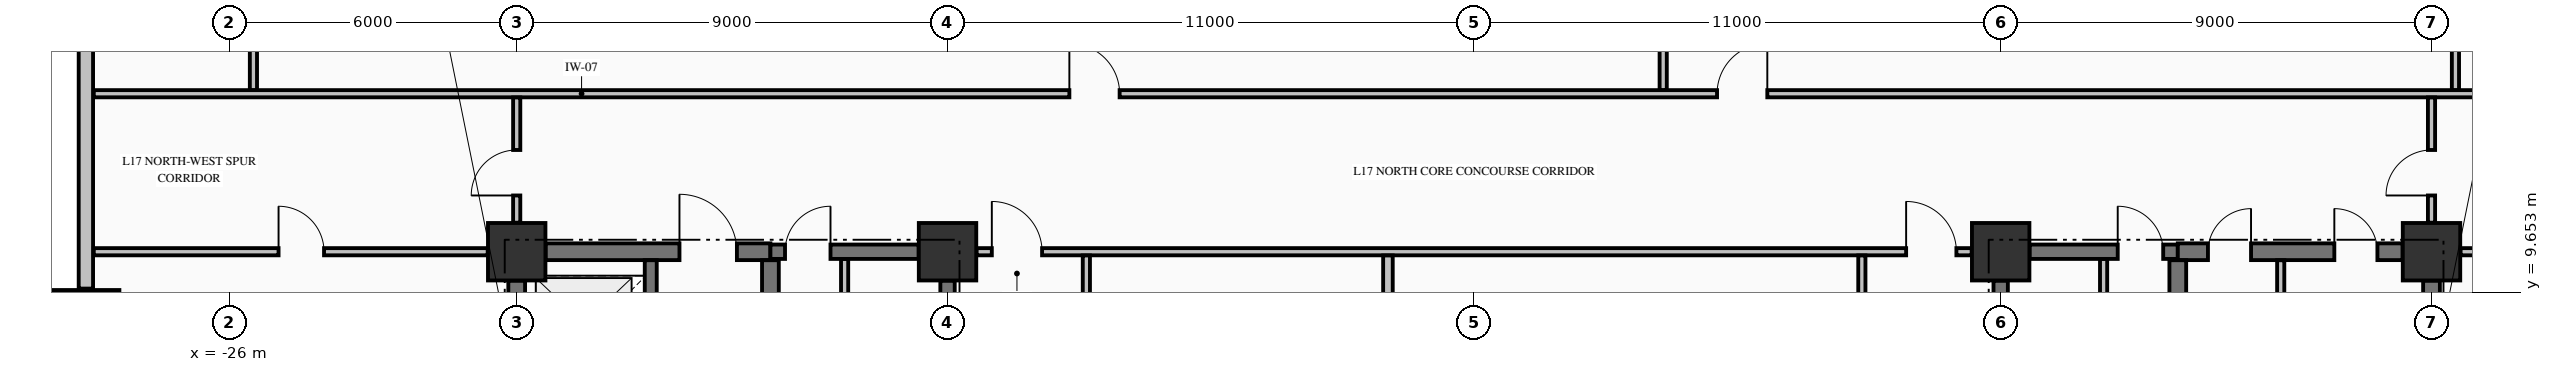
"""IFC4 building model, lengths in metres.
Left out: names, types, materials, properties, quantities, classifications, styles, units other than length and angle.
Written with IfcOpenShell. Run it as: python <this file> out.ifc"""

import sys

from ifc_helpers import new_model, si_unit, direction, frame, frame_2d, origin, origin_2d, place, context, subcontext, project, spatial, rectangle, extrude, element, fill, save


model = new_model("IFC4")
c1 = context("Model", 3, precision=1e-05, world=origin(), true_north=direction((0.0, 1.0)))
c2 = subcontext(c1, "Body", "Model", "MODEL_VIEW")
j1 = project(units=[si_unit("LENGTHUNIT", "METRE"), si_unit("PLANEANGLEUNIT", "RADIAN")], contexts=[c1])
p1 = place(None, origin())
s1 = spatial("IfcSite", under=j1, at=p1, CompositionType="ELEMENT")
p2 = place(p1, origin())
s2 = spatial("IfcBuilding", under=s1, at=p2, CompositionType="ELEMENT")
p3 = place(p2, frame((0.0, 0.0, 71.47)))
s3 = spatial("IfcBuildingStorey", under=s2, at=p3, CompositionType="ELEMENT", Elevation=71.47)
p4 = place(p3, frame((-29.0, 9.0, -0.325), z_axis=(0.0, 0.0, 1.0), x_axis=(1.0, 0.0, 0.0)))
e1 = element("IfcColumn", 1, at=p4, inside=s3, PredefinedType="COLUMN", context=c2, shape_type="SweptSolid", body=[
    extrude(rectangle(XDim=1.4, YDim=1.4, at=origin_2d()), origin(), (0.0, 0.0, 1.0), 3.645),
])
for number, where, z_axis, x_axis in (
    (2, (-20.0, 10.5, -0.325), (0.0, 0.0, 1.0), (1.0, 0.0, 0.0)),
    (3, (-11.0, 10.5, -0.325), (0.0, 0.0, 1.0), (1.0, 0.0, 0.0)),
    (4, (11.0, 10.5, -0.325), (0.0, 0.0, 1.0), (1.0, 0.0, 0.0)),
    (5, (20.0, 10.5, -0.325), (0.0, 0.0, 1.0), (1.0, 0.0, 0.0)),
):
    element("IfcColumn", number, at=place(p3, frame(where, z_axis=z_axis, x_axis=x_axis)), inside=s3, PredefinedType="COLUMN", context=c2, shape_type="SweptSolid", body=[
        extrude(rectangle(XDim=1.2, YDim=1.2, at=origin_2d()), origin(), (0.0, 0.0, 1.0), 3.645),
    ])
p5 = place(p3, frame((-29.0, 22.27, 0.0), z_axis=(0.0, 0.0, 1.0), x_axis=(0.0, -1.0, 0.0)))
e6 = element("IfcWall", 6, at=p5, inside=s3, PredefinedType="STANDARD", context=c2, shape_type="SweptSolid", body=[
    extrude(rectangle(XDim=12.54, YDim=0.3, at=frame_2d((6.27, 0.0))), origin(), (0.0, 0.0, 1.0), 2.712),
])
p6 = place(p3, frame((-19.396, 10.5, 0.0), z_axis=(0.0, 0.0, 1.0), x_axis=(1.0, 0.0, 0.0)))
e7 = element("IfcWall", 7, at=p6, inside=s3, PredefinedType="SHEAR", context=c2, shape_type="SweptSolid", body=[
    extrude(rectangle(XDim=4.696, YDim=0.35, at=frame_2d((2.348, 0.0))), origin(), (0.0, 0.0, 1.0), 3.32),
])
p7 = place(p6, frame((2.796, 0.0, 0.0)))
e8 = element("IfcOpeningElement", 8, at=p7, cuts=e7, PredefinedType="OPENING", context=c2, shape_type="SweptSolid", body=[
    extrude(rectangle(XDim=1.2, YDim=2.15, at=frame_2d((0.6, 1.075))), frame((0.0, 0.185, 0.0), z_axis=(0.0, -1.0, 0.0), x_axis=(1.0, 0.0, 0.0)), (0.0, 0.0, 1.0), 0.37),
])
p8 = place(p3, frame((-14.7, 10.5, 0.0), z_axis=(0.0, 0.0, 1.0), x_axis=(1.0, 0.0, 0.0)))
e9 = element("IfcWall", 9, at=p8, inside=s3, PredefinedType="SHEAR", context=c2, shape_type="SweptSolid", body=[
    extrude(rectangle(XDim=3.096, YDim=0.3, at=frame_2d((1.548, 0.0))), origin(), (0.0, 0.0, 1.0), 3.32),
])
p9 = place(p8, frame((0.305, 0.0, 0.0)))
e10 = element("IfcOpeningElement", 10, at=p9, cuts=e9, PredefinedType="OPENING", context=c2, shape_type="SweptSolid", body=[
    extrude(rectangle(XDim=0.95, YDim=2.15, at=frame_2d((0.475, 1.075))), frame((0.0, 0.16, 0.0), z_axis=(0.0, -1.0, 0.0), x_axis=(1.0, 0.0, 0.0)), (0.0, 0.0, 1.0), 0.32),
])
p10 = place(p3, frame((11.604, 10.5, 0.0), z_axis=(0.0, 0.0, 1.0), x_axis=(1.0, 0.0, 0.0)))
e11 = element("IfcWall", 11, at=p10, inside=s3, PredefinedType="SHEAR", context=c2, shape_type="SweptSolid", body=[
    extrude(rectangle(XDim=3.096, YDim=0.3, at=frame_2d((1.548, 0.0))), origin(), (0.0, 0.0, 1.0), 3.32),
])
p11 = place(p10, frame((1.841, 0.0, 0.0)))
e12 = element("IfcOpeningElement", 12, at=p11, cuts=e11, PredefinedType="OPENING", context=c2, shape_type="SweptSolid", body=[
    extrude(rectangle(XDim=0.95, YDim=2.15, at=frame_2d((0.475, 1.075))), frame((0.0, 0.16, 0.0), z_axis=(0.0, -1.0, 0.0), x_axis=(1.0, 0.0, 0.0)), (0.0, 0.0, 1.0), 0.32),
])
p12 = place(p3, frame((14.7, 10.5, 0.0), z_axis=(0.0, 0.0, 1.0), x_axis=(1.0, 0.0, 0.0)))
e13 = element("IfcWall", 13, at=p12, inside=s3, PredefinedType="SHEAR", context=c2, shape_type="SweptSolid", body=[
    extrude(rectangle(XDim=4.696, YDim=0.35, at=frame_2d((2.348, 0.0))), origin(), (0.0, 0.0, 1.0), 3.32),
])
p13 = place(p12, frame((0.63, 0.0, 0.0)))
e14 = element("IfcOpeningElement", 14, at=p13, cuts=e13, PredefinedType="OPENING", context=c2, shape_type="SweptSolid", body=[
    extrude(rectangle(XDim=0.9, YDim=2.15, at=frame_2d((0.45, 1.075))), frame((0.0, 0.185, 0.0), z_axis=(0.0, -1.0, 0.0), x_axis=(1.0, 0.0, 0.0)), (0.0, 0.0, 1.0), 0.37),
])
p14 = place(p12, frame((3.27, 0.0, 0.0)))
e15 = element("IfcOpeningElement", 15, at=p14, cuts=e13, PredefinedType="OPENING", context=c2, shape_type="SweptSolid", body=[
    extrude(rectangle(XDim=0.9, YDim=2.15, at=frame_2d((0.45, 1.075))), frame((0.0, 0.185, 0.0), z_axis=(0.0, -1.0, 0.0), x_axis=(1.0, 0.0, 0.0)), (0.0, 0.0, 1.0), 0.37),
])
p15 = place(p3, frame((-28.835, 10.5, 0.0), z_axis=(0.0, 0.0, 1.0), x_axis=(1.0, 0.0, 0.0)))
e16 = element("IfcWall", 16, at=p15, inside=s3, PredefinedType="PARTITIONING", context=c2, shape_type="SweptSolid", body=[
    extrude(rectangle(XDim=8.229, YDim=0.15, at=frame_2d((4.115, 0.0))), origin(), (0.0, 0.0, 1.0), 3.32),
])
p16 = place(p15, frame((3.86, 0.0, 0.0)))
e17 = element("IfcOpeningElement", 17, at=p16, cuts=e16, PredefinedType="OPENING", context=c2, shape_type="SweptSolid", body=[
    extrude(rectangle(XDim=0.95, YDim=2.15, at=frame_2d((0.475, 1.075))), frame((0.0, 0.085, 0.0), z_axis=(0.0, -1.0, 0.0), x_axis=(1.0, 0.0, 0.0)), (0.0, 0.0, 1.0), 0.17),
])
p17 = place(p3, frame((-10.394, 10.5, 0.0), z_axis=(0.0, 0.0, 1.0), x_axis=(1.0, 0.0, 0.0)))
e18 = element("IfcWall", 18, at=p17, inside=s3, PredefinedType="PARTITIONING", context=c2, shape_type="SweptSolid", body=[
    extrude(rectangle(XDim=20.788, YDim=0.15, at=frame_2d((10.394, 0.0))), origin(), (0.0, 0.0, 1.0), 3.32),
])
p18 = place(p17, frame((0.319, 0.0, 0.0)))
e19 = element("IfcOpeningElement", 19, at=p18, cuts=e18, PredefinedType="OPENING", context=c2, shape_type="SweptSolid", body=[
    extrude(rectangle(XDim=1.05, YDim=2.15, at=frame_2d((0.525, 1.075))), frame((0.0, 0.085, 0.0), z_axis=(0.0, -1.0, 0.0), x_axis=(1.0, 0.0, 0.0)), (0.0, 0.0, 1.0), 0.17),
])
p19 = place(p17, frame((19.419, 0.0, 0.0)))
e20 = element("IfcOpeningElement", 20, at=p19, cuts=e18, PredefinedType="OPENING", context=c2, shape_type="SweptSolid", body=[
    extrude(rectangle(XDim=1.05, YDim=2.15, at=frame_2d((0.525, 1.075))), frame((0.0, 0.085, 0.0), z_axis=(0.0, -1.0, 0.0), x_axis=(1.0, 0.0, 0.0)), (0.0, 0.0, 1.0), 0.17),
])
p20 = place(p3, frame((20.606, 10.5, 0.0), z_axis=(0.0, 0.0, 1.0), x_axis=(1.0, 0.0, 0.0)))
e21 = element("IfcWall", 21, at=p20, inside=s3, PredefinedType="PARTITIONING", context=c2, shape_type="SweptSolid", body=[
    extrude(rectangle(XDim=3.229, YDim=0.15, at=frame_2d((1.615, 0.0))), origin(), (0.0, 0.0, 1.0), 3.32),
])
p21 = place(p20, frame((0.894, 0.0, 0.0)))
e22 = element("IfcOpeningElement", 22, at=p21, cuts=e21, PredefinedType="OPENING", context=c2, shape_type="SweptSolid", body=[
    extrude(rectangle(XDim=1.0, YDim=2.15, at=frame_2d((0.5, 1.075))), frame((0.0, 0.085, 0.0), z_axis=(0.0, -1.0, 0.0), x_axis=(1.0, 0.0, 0.0)), (0.0, 0.0, 1.0), 0.17),
])
p22 = place(p3, frame((-28.835, 13.8, 0.0), z_axis=(0.0, 0.0, 1.0), x_axis=(1.0, 0.0, 0.0)))
e23 = element("IfcWall", 23, at=p22, inside=s3, PredefinedType="PARTITIONING", context=c2, shape_type="SweptSolid", body=[
    extrude(rectangle(XDim=52.67, YDim=0.15, at=frame_2d((26.335, 0.0))), origin(), (0.0, 0.0, 1.0), 3.32),
])
p23 = place(p22, frame((20.38, 0.0, 0.0)))
e24 = element("IfcOpeningElement", 24, at=p23, cuts=e23, PredefinedType="OPENING", context=c2, shape_type="SweptSolid", body=[
    extrude(rectangle(XDim=1.05, YDim=2.15, at=frame_2d((0.525, 1.075))), frame((0.0, 0.085, 0.0), z_axis=(0.0, -1.0, 0.0), x_axis=(1.0, 0.0, 0.0)), (0.0, 0.0, 1.0), 0.17),
])
p24 = place(p22, frame((33.91, 0.0, 0.0)))
e25 = element("IfcOpeningElement", 25, at=p24, cuts=e23, PredefinedType="OPENING", context=c2, shape_type="SweptSolid", body=[
    extrude(rectangle(XDim=1.05, YDim=2.15, at=frame_2d((0.525, 1.075))), frame((0.0, 0.085, 0.0), z_axis=(0.0, -1.0, 0.0), x_axis=(1.0, 0.0, 0.0)), (0.0, 0.0, 1.0), 0.17),
])
p25 = place(p3, frame((-20.0, 7.727, 0.0), z_axis=(0.0, 0.0, 1.0), x_axis=(0.0, 1.0, 0.0)))
e26 = element("IfcWall", 26, at=p25, inside=s3, PredefinedType="SHEAR", context=c2, shape_type="SweptSolid", body=[
    extrude(rectangle(XDim=2.169, YDim=0.35, at=frame_2d((1.084, 0.0))), origin(), (0.0, 0.0, 1.0), 3.32),
])
p26 = place(p3, frame((-17.2, 7.727, 0.0), z_axis=(0.0, 0.0, 1.0), x_axis=(0.0, 1.0, 0.0)))
e27 = element("IfcWall", 27, at=p26, inside=s3, PredefinedType="SOLIDWALL", context=c2, shape_type="SweptSolid", body=[
    extrude(rectangle(XDim=2.596, YDim=0.25, at=frame_2d((1.298, 0.0))), origin(), (0.0, 0.0, 1.0), 3.32),
])
p27 = place(p26, frame((0.773, 0.0, 0.0)))
e28 = element("IfcOpeningElement", 28, at=p27, cuts=e27, PredefinedType="OPENING", context=c2, shape_type="SweptSolid", body=[
    extrude(rectangle(XDim=1.1, YDim=2.2, at=frame_2d((0.55, 1.1))), frame((0.0, 0.135, 0.0), z_axis=(0.0, -1.0, 0.0), x_axis=(1.0, 0.0, 0.0)), (0.0, 0.0, 1.0), 0.27),
])
p28 = place(p3, frame((-14.7, 5.852, 0.0), z_axis=(0.0, 0.0, 1.0), x_axis=(0.0, 1.0, 0.0)))
e29 = element("IfcWall", 29, at=p28, inside=s3, PredefinedType="SHEAR", context=c2, shape_type="SweptSolid", body=[
    extrude(rectangle(XDim=4.471, YDim=0.35, at=frame_2d((2.235, 0.0))), origin(), (0.0, 0.0, 1.0), 3.32),
])
for number, where, z_axis, x_axis in (
    (30, (-11.0, 5.852, 0.0), (0.0, 0.0, 1.0), (0.0, 1.0, 0.0)),
    (31, (11.0, 5.852, 0.0), (0.0, 0.0, 1.0), (0.0, 1.0, 0.0)),
):
    element("IfcWall", number, at=place(p3, frame(where, z_axis=z_axis, x_axis=x_axis)), inside=s3, PredefinedType="SHEAR", context=c2, shape_type="SweptSolid", body=[
        extrude(rectangle(XDim=4.044, YDim=0.3, at=frame_2d((2.022, 0.0))), origin(), (0.0, 0.0, 1.0), 3.32),
    ])
p29 = place(p3, frame((14.7, 5.852, 0.0), z_axis=(0.0, 0.0, 1.0), x_axis=(0.0, 1.0, 0.0)))
e32 = element("IfcWall", 32, at=p29, inside=s3, PredefinedType="SHEAR", context=c2, shape_type="SweptSolid", body=[
    extrude(rectangle(XDim=4.471, YDim=0.35, at=frame_2d((2.235, 0.0))), origin(), (0.0, 0.0, 1.0), 3.32),
])
p30 = place(p3, frame((20.0, 0.604, 0.0), z_axis=(0.0, 0.0, 1.0), x_axis=(0.0, 1.0, 0.0)))
e33 = element("IfcWall", 33, at=p30, inside=s3, PredefinedType="SHEAR", context=c2, shape_type="SweptSolid", body=[
    extrude(rectangle(XDim=9.292, YDim=0.35, at=frame_2d((4.646, 0.0))), origin(), (0.0, 0.0, 1.0), 3.32),
])
p31 = place(p3, frame((-25.5, 13.878, 0.0), z_axis=(0.0, 0.0, 1.0), x_axis=(0.0, 1.0, 0.0)))
e34 = element("IfcWall", 34, at=p31, inside=s3, PredefinedType="PARTITIONING", context=c2, shape_type="SweptSolid", body=[
    extrude(rectangle(XDim=8.416, YDim=0.15, at=frame_2d((4.208, 0.0))), origin(), (0.0, 0.0, 1.0), 3.32),
])
p32 = place(p3, frame((-20.0, 11.106, 0.0), z_axis=(0.0, 0.0, 1.0), x_axis=(0.0, 1.0, 0.0)))
e35 = element("IfcWall", 35, at=p32, inside=s3, PredefinedType="PARTITIONING", context=c2, shape_type="SweptSolid", body=[
    extrude(rectangle(XDim=2.616, YDim=0.15, at=frame_2d((1.308, 0.0))), origin(), (0.0, 0.0, 1.0), 2.66),
])
p33 = place(p32, frame((0.569, 0.0, 0.0)))
e36 = element("IfcOpeningElement", 36, at=p33, cuts=e35, PredefinedType="OPENING", context=c2, shape_type="SweptSolid", body=[
    extrude(rectangle(XDim=0.95, YDim=2.15, at=frame_2d((0.475, 1.075))), frame((0.0, 0.085, 0.0), z_axis=(0.0, -1.0, 0.0), x_axis=(1.0, 0.0, 0.0)), (0.0, 0.0, 1.0), 0.17),
])
p34 = place(p3, frame((-13.15, 7.228, 0.0), z_axis=(0.0, 0.0, 1.0), x_axis=(0.0, 1.0, 0.0)))
e37 = element("IfcWall", 37, at=p34, inside=s3, PredefinedType="PARTITIONING", context=c2, shape_type="SweptSolid", body=[
    extrude(rectangle(XDim=3.119, YDim=0.15, at=frame_2d((1.56, 0.0))), origin(), (0.0, 0.0, 1.0), 3.32),
])
p35 = place(p34, frame((1.097, 0.0, 0.0)))
e38 = element("IfcOpeningElement", 38, at=p35, cuts=e37, PredefinedType="OPENING", context=c2, shape_type="SweptSolid", body=[
    extrude(rectangle(XDim=0.95, YDim=2.15, at=frame_2d((0.475, 1.075))), frame((0.0, 0.085, 0.0), z_axis=(0.0, -1.0, 0.0), x_axis=(1.0, 0.0, 0.0)), (0.0, 0.0, 1.0), 0.17),
])
p36 = place(p3, frame((-8.1, -3.097, 0.0), z_axis=(0.0, 0.0, 1.0), x_axis=(0.0, 1.0, 0.0)))
e39 = element("IfcWall", 39, at=p36, inside=s3, PredefinedType="PARTITIONING", context=c2, shape_type="SweptSolid", body=[
    extrude(rectangle(XDim=13.519, YDim=0.15, at=frame_2d((6.76, 0.0))), origin(), (0.0, 0.0, 1.0), 3.32),
])
p37 = place(p36, frame((6.222, 0.0, 0.0)))
e40 = element("IfcOpeningElement", 40, at=p37, cuts=e39, PredefinedType="OPENING", context=c2, shape_type="SweptSolid", body=[
    extrude(rectangle(XDim=1.05, YDim=2.15, at=frame_2d((0.525, 1.075))), frame((0.0, 0.085, 0.0), z_axis=(0.0, -1.0, 0.0), x_axis=(1.0, 0.0, 0.0)), (0.0, 0.0, 1.0), 0.17),
])
p38 = place(p3, frame((-1.8, -1.097, 0.0), z_axis=(0.0, 0.0, 1.0), x_axis=(0.0, 1.0, 0.0)))
e41 = element("IfcWall", 41, at=p38, inside=s3, PredefinedType="PARTITIONING", context=c2, shape_type="SweptSolid", body=[
    extrude(rectangle(XDim=11.519, YDim=0.2, at=frame_2d((5.76, 0.0))), origin(), (0.0, 0.0, 1.0), 3.32),
])
p39 = place(p3, frame((3.95, 13.878, 0.0), z_axis=(0.0, 0.0, 1.0), x_axis=(0.0, 1.0, 0.0)))
e42 = element("IfcWall", 42, at=p39, inside=s3, PredefinedType="PARTITIONING", context=c2, shape_type="SweptSolid", body=[
    extrude(rectangle(XDim=12.562, YDim=0.15, at=frame_2d((6.281, 0.0))), origin(), (0.0, 0.0, 1.0), 3.32),
])
p40 = place(p3, frame((8.1, -1.097, 0.0), z_axis=(0.0, 0.0, 1.0), x_axis=(0.0, 1.0, 0.0)))
e43 = element("IfcWall", 43, at=p40, inside=s3, PredefinedType="PARTITIONING", context=c2, shape_type="SweptSolid", body=[
    extrude(rectangle(XDim=11.519, YDim=0.15, at=frame_2d((5.76, 0.0))), origin(), (0.0, 0.0, 1.0), 3.32),
])
p41 = place(p40, frame((5.197, 0.0, 0.0)))
e44 = element("IfcOpeningElement", 44, at=p41, cuts=e43, PredefinedType="OPENING", context=c2, shape_type="SweptSolid", body=[
    extrude(rectangle(XDim=1.1, YDim=2.15, at=frame_2d((0.55, 1.075))), frame((0.0, 0.085, 0.0), z_axis=(0.0, -1.0, 0.0), x_axis=(1.0, 0.0, 0.0)), (0.0, 0.0, 1.0), 0.17),
])
p42 = place(p3, frame((13.15, 7.228, 0.0), z_axis=(0.0, 0.0, 1.0), x_axis=(0.0, 1.0, 0.0)))
e45 = element("IfcWall", 45, at=p42, inside=s3, PredefinedType="PARTITIONING", context=c2, shape_type="SweptSolid", body=[
    extrude(rectangle(XDim=3.119, YDim=0.15, at=frame_2d((1.56, 0.0))), origin(), (0.0, 0.0, 1.0), 3.32),
])
p43 = place(p42, frame((1.097, 0.0, 0.0)))
e46 = element("IfcOpeningElement", 46, at=p43, cuts=e45, PredefinedType="OPENING", context=c2, shape_type="SweptSolid", body=[
    extrude(rectangle(XDim=0.95, YDim=2.15, at=frame_2d((0.475, 1.075))), frame((0.0, 0.085, 0.0), z_axis=(0.0, -1.0, 0.0), x_axis=(1.0, 0.0, 0.0)), (0.0, 0.0, 1.0), 0.17),
])
p44 = place(p3, frame((16.85, 3.078, 0.0), z_axis=(0.0, 0.0, 1.0), x_axis=(0.0, 1.0, 0.0)))
e47 = element("IfcWall", 47, at=p44, inside=s3, PredefinedType="PARTITIONING", context=c2, shape_type="SweptSolid", body=[
    extrude(rectangle(XDim=7.244, YDim=0.15, at=frame_2d((3.622, 0.0))), origin(), (0.0, 0.0, 1.0), 3.32),
])
p45 = place(p3, frame((20.0, 11.106, 0.0), z_axis=(0.0, 0.0, 1.0), x_axis=(0.0, 1.0, 0.0)))
e48 = element("IfcWall", 48, at=p45, inside=s3, PredefinedType="PARTITIONING", context=c2, shape_type="SweptSolid", body=[
    extrude(rectangle(XDim=2.616, YDim=0.15, at=frame_2d((1.308, 0.0))), origin(), (0.0, 0.0, 1.0), 3.32),
])
p46 = place(p45, frame((0.569, 0.0, 0.0)))
e49 = element("IfcOpeningElement", 49, at=p46, cuts=e48, PredefinedType="OPENING", context=c2, shape_type="SweptSolid", body=[
    extrude(rectangle(XDim=0.95, YDim=2.15, at=frame_2d((0.475, 1.075))), frame((0.0, 0.085, 0.0), z_axis=(0.0, -1.0, 0.0), x_axis=(1.0, 0.0, 0.0)), (0.0, 0.0, 1.0), 0.17),
])
p47 = place(p3, frame((20.5, 13.878, 0.0), z_axis=(0.0, 0.0, 1.0), x_axis=(0.0, 1.0, 0.0)))
e50 = element("IfcWall", 50, at=p47, inside=s3, PredefinedType="PARTITIONING", context=c2, shape_type="SweptSolid", body=[
    extrude(rectangle(XDim=8.416, YDim=0.15, at=frame_2d((4.208, 0.0))), origin(), (0.0, 0.0, 1.0), 3.32),
])
p48 = place(p9, origin())
e51 = element("IfcDoor", 51, at=p48, inside=s3, OperationType="SINGLE_SWING_RIGHT", PredefinedType="DOOR", context=c2, shape_type="SweptSolid", body=[
    extrude(rectangle(XDim=0.95, YDim=2.15, at=frame_2d((0.475, 1.075))), frame((0.0, 0.025, 0.0), z_axis=(0.0, -1.0, 0.0), x_axis=(1.0, 0.0, 0.0)), (0.0, 0.0, 1.0), 0.05),
])
fill(e10, e51)
p49 = place(p11, origin())
e52 = element("IfcDoor", 52, at=p49, inside=s3, OperationType="SINGLE_SWING_LEFT", PredefinedType="DOOR", context=c2, shape_type="SweptSolid", body=[
    extrude(rectangle(XDim=0.95, YDim=2.15, at=frame_2d((0.475, 1.075))), frame((0.0, 0.025, 0.0), z_axis=(0.0, -1.0, 0.0), x_axis=(1.0, 0.0, 0.0)), (0.0, 0.0, 1.0), 0.05),
])
fill(e12, e52)
p50 = place(p7, origin())
e53 = element("IfcDoor", 53, at=p50, inside=s3, OperationType="SINGLE_SWING_LEFT", PredefinedType="DOOR", context=c2, shape_type="SweptSolid", body=[
    extrude(rectangle(XDim=1.2, YDim=2.15, at=frame_2d((0.6, 1.075))), frame((0.0, 0.025, 0.0), z_axis=(0.0, -1.0, 0.0), x_axis=(1.0, 0.0, 0.0)), (0.0, 0.0, 1.0), 0.05),
])
fill(e8, e53)
p51 = place(p13, origin())
e54 = element("IfcDoor", 54, at=p51, inside=s3, OperationType="SINGLE_SWING_RIGHT", PredefinedType="DOOR", context=c2, shape_type="SweptSolid", body=[
    extrude(rectangle(XDim=0.9, YDim=2.15, at=frame_2d((0.45, 1.075))), frame((0.0, 0.025, 0.0), z_axis=(0.0, -1.0, 0.0), x_axis=(1.0, 0.0, 0.0)), (0.0, 0.0, 1.0), 0.05),
])
fill(e14, e54)
p52 = place(p14, origin())
e55 = element("IfcDoor", 55, at=p52, inside=s3, OperationType="SINGLE_SWING_LEFT", PredefinedType="DOOR", context=c2, shape_type="SweptSolid", body=[
    extrude(rectangle(XDim=0.9, YDim=2.15, at=frame_2d((0.45, 1.075))), frame((0.0, 0.025, 0.0), z_axis=(0.0, -1.0, 0.0), x_axis=(1.0, 0.0, 0.0)), (0.0, 0.0, 1.0), 0.05),
])
fill(e15, e55)
p53 = place(p18, origin())
e56 = element("IfcDoor", 56, at=p53, inside=s3, OperationType="SINGLE_SWING_LEFT", PredefinedType="DOOR", context=c2, shape_type="SweptSolid", body=[
    extrude(rectangle(XDim=1.05, YDim=2.15, at=frame_2d((0.525, 1.075))), frame((0.0, 0.025, 0.0), z_axis=(0.0, -1.0, 0.0), x_axis=(1.0, 0.0, 0.0)), (0.0, 0.0, 1.0), 0.05),
])
fill(e19, e56)
p54 = place(p19, origin())
e57 = element("IfcDoor", 57, at=p54, inside=s3, OperationType="SINGLE_SWING_LEFT", PredefinedType="DOOR", context=c2, shape_type="SweptSolid", body=[
    extrude(rectangle(XDim=1.05, YDim=2.15, at=frame_2d((0.525, 1.075))), frame((0.0, 0.025, 0.0), z_axis=(0.0, -1.0, 0.0), x_axis=(1.0, 0.0, 0.0)), (0.0, 0.0, 1.0), 0.05),
])
fill(e20, e57)
p55 = place(p23, origin())
e58 = element("IfcDoor", 58, at=p55, inside=s3, OperationType="SINGLE_SWING_LEFT", PredefinedType="DOOR", context=c2, shape_type="SweptSolid", body=[
    extrude(rectangle(XDim=1.05, YDim=2.15, at=frame_2d((0.525, 1.075))), frame((0.0, 0.025, 0.0), z_axis=(0.0, -1.0, 0.0), x_axis=(1.0, 0.0, 0.0)), (0.0, 0.0, 1.0), 0.05),
])
fill(e24, e58)
p56 = place(p24, origin())
e59 = element("IfcDoor", 59, at=p56, inside=s3, OperationType="SINGLE_SWING_RIGHT", PredefinedType="DOOR", context=c2, shape_type="SweptSolid", body=[
    extrude(rectangle(XDim=1.05, YDim=2.15, at=frame_2d((0.525, 1.075))), frame((0.0, 0.025, 0.0), z_axis=(0.0, -1.0, 0.0), x_axis=(1.0, 0.0, 0.0)), (0.0, 0.0, 1.0), 0.05),
])
fill(e25, e59)
p57 = place(p33, origin())
e60 = element("IfcDoor", 60, at=p57, inside=s3, OperationType="SINGLE_SWING_LEFT", PredefinedType="DOOR", context=c2, shape_type="SweptSolid", body=[
    extrude(rectangle(XDim=0.95, YDim=2.15, at=frame_2d((0.475, 1.075))), frame((0.0, 0.025, 0.0), z_axis=(0.0, -1.0, 0.0), x_axis=(1.0, 0.0, 0.0)), (0.0, 0.0, 1.0), 0.05),
])
fill(e36, e60)
p58 = place(p16, origin())
e61 = element("IfcDoor", 61, at=p58, inside=s3, OperationType="SINGLE_SWING_LEFT", PredefinedType="DOOR", context=c2, shape_type="SweptSolid", body=[
    extrude(rectangle(XDim=0.95, YDim=2.15, at=frame_2d((0.475, 1.075))), frame((0.0, 0.025, 0.0), z_axis=(0.0, -1.0, 0.0), x_axis=(1.0, 0.0, 0.0)), (0.0, 0.0, 1.0), 0.05),
])
fill(e17, e61)
p59 = place(p46, origin())
e62 = element("IfcDoor", 62, at=p59, inside=s3, OperationType="SINGLE_SWING_LEFT", PredefinedType="DOOR", context=c2, shape_type="SweptSolid", body=[
    extrude(rectangle(XDim=0.95, YDim=2.15, at=frame_2d((0.475, 1.075))), frame((0.0, 0.025, 0.0), z_axis=(0.0, -1.0, 0.0), x_axis=(1.0, 0.0, 0.0)), (0.0, 0.0, 1.0), 0.05),
])
fill(e49, e62)
save(model, sys.argv[1])
